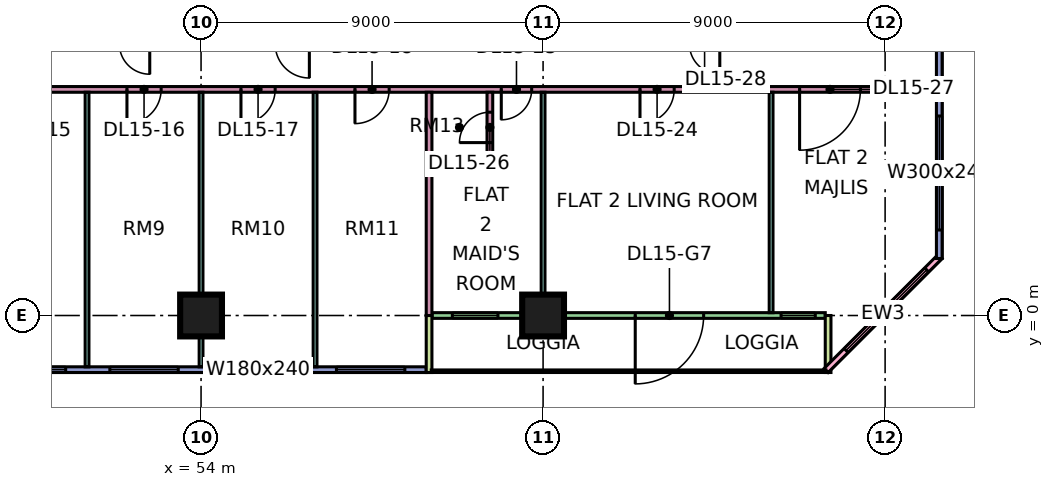
"""IFC4 building model, lengths in metres.
Left out: names, types, materials, properties, quantities, classifications, styles, units other than length and angle.
Written with IfcOpenShell. Run it as: python <this file> out.ifc"""

import sys

from ifc_helpers import new_model, si_unit, direction, frame, frame_2d, origin, origin_2d, place, context, subcontext, project, spatial, rectangle, extrude, element, fill, save


model = new_model("IFC4")
c1 = context("Model", 3, precision=1e-05, world=origin(), true_north=direction((0.0, 1.0)))
c2 = subcontext(c1, "Body", "Model", "MODEL_VIEW")
j1 = project(units=[si_unit("LENGTHUNIT", "METRE"), si_unit("PLANEANGLEUNIT", "RADIAN")], contexts=[c1])
p1 = place(None, origin())
s1 = spatial("IfcSite", under=j1, at=p1, CompositionType="ELEMENT")
p2 = place(p1, origin())
s2 = spatial("IfcBuilding", under=s1, at=p2, CompositionType="ELEMENT")
p3 = place(p2, frame((0.0, 0.0, 71.4)))
s3 = spatial("IfcBuildingStorey", under=s2, at=p3, CompositionType="ELEMENT", Elevation=71.4)
for number, where, z_axis, x_axis in (
    (1, (54.0, 0.0, 0.0), (0.0, 0.0, 1.0), (1.0, 0.0, 0.0)),
    (2, (63.0, 0.0, 0.0), (0.0, 0.0, 1.0), (1.0, 0.0, 0.0)),
):
    element("IfcColumn", number, at=place(p3, frame(where, z_axis=z_axis, x_axis=x_axis)), inside=s3, PredefinedType="COLUMN", context=c2, shape_type="SweptSolid", body=[
        extrude(rectangle(XDim=1.1, YDim=1.1, at=origin_2d()), origin(), (0.0, 0.0, 1.0), 3.75),
    ])
p4 = place(p3, frame((48.075, -1.425, 0.0), z_axis=(0.0, 0.0, 1.0), x_axis=(1.0, 0.0, 0.0)))
e3 = element("IfcWall", 3, at=p4, inside=s3, PredefinedType="SOLIDWALL", context=c2, shape_type="SweptSolid", body=[
    extrude(rectangle(XDim=11.85, YDim=0.15, at=frame_2d((5.925, 0.0))), origin(), (0.0, 0.0, 1.0), 3.35),
])
p5 = place(p4, frame((0.562, 0.0, 0.45)))
e4 = element("IfcOpeningElement", 4, at=p5, cuts=e3, PredefinedType="OPENING", context=c2, shape_type="SweptSolid", body=[
    extrude(rectangle(XDim=1.8, YDim=2.4, at=frame_2d((0.9, 1.2))), frame((0.0, 0.085, 0.0), z_axis=(0.0, -1.0, 0.0), x_axis=(1.0, 0.0, 0.0)), (0.0, 0.0, 1.0), 0.17),
])
p6 = place(p4, frame((3.525, 0.0, 0.45)))
e5 = element("IfcOpeningElement", 5, at=p6, cuts=e3, PredefinedType="OPENING", context=c2, shape_type="SweptSolid", body=[
    extrude(rectangle(XDim=1.8, YDim=2.4, at=frame_2d((0.9, 1.2))), frame((0.0, 0.085, 0.0), z_axis=(0.0, -1.0, 0.0), x_axis=(1.0, 0.0, 0.0)), (0.0, 0.0, 1.0), 0.17),
])
p7 = place(p4, frame((6.525, 0.0, 0.45)))
e6 = element("IfcOpeningElement", 6, at=p7, cuts=e3, PredefinedType="OPENING", context=c2, shape_type="SweptSolid", body=[
    extrude(rectangle(XDim=1.8, YDim=2.4, at=frame_2d((0.9, 1.2))), frame((0.0, 0.085, 0.0), z_axis=(0.0, -1.0, 0.0), x_axis=(1.0, 0.0, 0.0)), (0.0, 0.0, 1.0), 0.17),
])
p8 = place(p4, frame((9.488, 0.0, 0.45)))
e7 = element("IfcOpeningElement", 7, at=p8, cuts=e3, PredefinedType="OPENING", context=c2, shape_type="SweptSolid", body=[
    extrude(rectangle(XDim=1.8, YDim=2.4, at=frame_2d((0.9, 1.2))), frame((0.0, 0.085, 0.0), z_axis=(0.0, -1.0, 0.0), x_axis=(1.0, 0.0, 0.0)), (0.0, 0.0, 1.0), 0.17),
])
p9 = place(p3, frame((60.075, 0.0, 0.0), z_axis=(0.0, 0.0, 1.0), x_axis=(1.0, 0.0, 0.0)))
e8 = element("IfcWall", 8, at=p9, inside=s3, PredefinedType="SOLIDWALL", context=c2, shape_type="SweptSolid", body=[
    extrude(rectangle(XDim=10.35, YDim=0.15, at=frame_2d((5.175, 0.0))), origin(), (0.0, 0.0, 1.0), 3.35),
])
p10 = place(p9, frame((0.538, 0.0, 0.45)))
e9 = element("IfcOpeningElement", 9, at=p10, cuts=e8, PredefinedType="OPENING", context=c2, shape_type="SweptSolid", body=[
    extrude(rectangle(XDim=1.2, YDim=2.4, at=frame_2d((0.6, 1.2))), frame((0.0, 0.085, 0.0), z_axis=(0.0, -1.0, 0.0), x_axis=(1.0, 0.0, 0.0)), (0.0, 0.0, 1.0), 0.17),
])
p11 = place(p9, frame((5.35, 0.0, 0.0)))
e10 = element("IfcOpeningElement", 10, at=p11, cuts=e8, PredefinedType="OPENING", context=c2, shape_type="SweptSolid", body=[
    extrude(rectangle(XDim=1.8, YDim=2.4, at=frame_2d((0.9, 1.2))), frame((0.0, 0.085, 0.0), z_axis=(0.0, -1.0, 0.0), x_axis=(1.0, 0.0, 0.0)), (0.0, 0.0, 1.0), 0.17),
])
p12 = place(p9, frame((9.188, 0.0, 0.45)))
e11 = element("IfcOpeningElement", 11, at=p12, cuts=e8, PredefinedType="OPENING", context=c2, shape_type="SweptSolid", body=[
    extrude(rectangle(XDim=0.9, YDim=2.4, at=frame_2d((0.45, 1.2))), frame((0.0, 0.085, 0.0), z_axis=(0.0, -1.0, 0.0), x_axis=(1.0, 0.0, 0.0)), (0.0, 0.0, 1.0), 0.17),
])
for number, where, z_axis, x_axis in (
    (12, (60.0, -1.5, 0.0), (0.0, 0.0, 1.0), (0.0, 1.0, 0.0)),
    (13, (70.5, -1.5, 0.0), (0.0, 0.0, 1.0), (0.0, 1.0, 0.0)),
):
    element("IfcWall", number, at=place(p3, frame(where, z_axis=z_axis, x_axis=x_axis)), inside=s3, PredefinedType="SOLIDWALL", context=c2, shape_type="SweptSolid", body=[
        extrude(rectangle(XDim=1.5, YDim=0.15, at=frame_2d((0.75, 0.0))), origin(), (0.0, 0.0, 1.0), 3.35),
    ])
p13 = place(p3, frame((70.447, -1.447, 0.0), z_axis=(0.0, 0.0, 1.0), x_axis=(0.707106781187, 0.707106781187, 0.0)))
e14 = element("IfcWall", 14, at=p13, inside=s3, PredefinedType="SOLIDWALL", context=c2, shape_type="SweptSolid", body=[
    extrude(rectangle(XDim=4.243, YDim=0.15, at=frame_2d((2.121, 0.0))), origin(), (0.0, 0.0, 1.0), 3.35),
])
p14 = place(p13, frame((0.744, 0.0, 0.45)))
e15 = element("IfcOpeningElement", 15, at=p14, cuts=e14, PredefinedType="OPENING", context=c2, shape_type="SweptSolid", body=[
    extrude(rectangle(XDim=3.0, YDim=2.4, at=frame_2d((1.5, 1.2))), frame((0.0, 0.085, 0.0), z_axis=(0.0, -1.0, 0.0), x_axis=(1.0, 0.0, 0.0)), (0.0, 0.0, 1.0), 0.17),
])
p15 = place(p3, frame((73.425, 1.5, 0.0), z_axis=(0.0, 0.0, 1.0), x_axis=(0.0, 1.0, 0.0)))
e16 = element("IfcWall", 16, at=p15, inside=s3, PredefinedType="SOLIDWALL", context=c2, shape_type="SweptSolid", body=[
    extrude(rectangle(XDim=10.425, YDim=0.15, at=frame_2d((5.212, 0.0))), origin(), (0.0, 0.0, 1.0), 3.35),
])
p16 = place(p15, frame((0.75, 0.0, 0.45)))
e17 = element("IfcOpeningElement", 17, at=p16, cuts=e16, PredefinedType="OPENING", context=c2, shape_type="SweptSolid", body=[
    extrude(rectangle(XDim=3.0, YDim=2.4, at=frame_2d((1.5, 1.2))), frame((0.0, 0.085, 0.0), z_axis=(0.0, -1.0, 0.0), x_axis=(1.0, 0.0, 0.0)), (0.0, 0.0, 1.0), 0.17),
])
p17 = place(p3, frame((48.1, 5.95, 0.0), z_axis=(0.0, 0.0, 1.0), x_axis=(1.0, 0.0, 0.0)))
e18 = element("IfcWall", 18, at=p17, inside=s3, PredefinedType="PARTITIONING", context=c2, shape_type="SweptSolid", body=[
    extrude(rectangle(XDim=25.25, YDim=0.15, at=frame_2d((12.625, 0.0))), origin(), (0.0, 0.0, 1.0), 3.35),
])
p18 = place(p17, frame((0.95, 0.0, 0.0)))
e19 = element("IfcOpeningElement", 19, at=p18, cuts=e18, PredefinedType="OPENING", context=c2, shape_type="SweptSolid", body=[
    extrude(rectangle(XDim=0.9, YDim=2.1, at=frame_2d((0.45, 1.05))), frame((0.0, 0.085, 0.0), z_axis=(0.0, -1.0, 0.0), x_axis=(1.0, 0.0, 0.0)), (0.0, 0.0, 1.0), 0.17),
])
p19 = place(p17, frame((3.95, 0.0, 0.0)))
e20 = element("IfcOpeningElement", 20, at=p19, cuts=e18, PredefinedType="OPENING", context=c2, shape_type="SweptSolid", body=[
    extrude(rectangle(XDim=0.9, YDim=2.1, at=frame_2d((0.45, 1.05))), frame((0.0, 0.085, 0.0), z_axis=(0.0, -1.0, 0.0), x_axis=(1.0, 0.0, 0.0)), (0.0, 0.0, 1.0), 0.17),
])
p20 = place(p17, frame((6.95, 0.0, 0.0)))
e21 = element("IfcOpeningElement", 21, at=p20, cuts=e18, PredefinedType="OPENING", context=c2, shape_type="SweptSolid", body=[
    extrude(rectangle(XDim=0.9, YDim=2.1, at=frame_2d((0.45, 1.05))), frame((0.0, 0.085, 0.0), z_axis=(0.0, -1.0, 0.0), x_axis=(1.0, 0.0, 0.0)), (0.0, 0.0, 1.0), 0.17),
])
p21 = place(p17, frame((9.95, 0.0, 0.0)))
e22 = element("IfcOpeningElement", 22, at=p21, cuts=e18, PredefinedType="OPENING", context=c2, shape_type="SweptSolid", body=[
    extrude(rectangle(XDim=0.9, YDim=2.1, at=frame_2d((0.45, 1.05))), frame((0.0, 0.085, 0.0), z_axis=(0.0, -1.0, 0.0), x_axis=(1.0, 0.0, 0.0)), (0.0, 0.0, 1.0), 0.17),
])
p22 = place(p17, frame((17.45, 0.0, 0.0)))
e23 = element("IfcOpeningElement", 23, at=p22, cuts=e18, PredefinedType="OPENING", context=c2, shape_type="SweptSolid", body=[
    extrude(rectangle(XDim=0.9, YDim=2.1, at=frame_2d((0.45, 1.05))), frame((0.0, 0.085, 0.0), z_axis=(0.0, -1.0, 0.0), x_axis=(1.0, 0.0, 0.0)), (0.0, 0.0, 1.0), 0.17),
])
p23 = place(p17, frame((13.8, 0.0, 0.0)))
e24 = element("IfcOpeningElement", 24, at=p23, cuts=e18, PredefinedType="OPENING", context=c2, shape_type="SweptSolid", body=[
    extrude(rectangle(XDim=0.8, YDim=2.1, at=frame_2d((0.4, 1.05))), frame((0.0, 0.085, 0.0), z_axis=(0.0, -1.0, 0.0), x_axis=(1.0, 0.0, 0.0)), (0.0, 0.0, 1.0), 0.17),
])
p24 = place(p17, frame((21.65, 0.0, 0.0)))
e25 = element("IfcOpeningElement", 25, at=p24, cuts=e18, PredefinedType="OPENING", context=c2, shape_type="SweptSolid", body=[
    extrude(rectangle(XDim=1.6, YDim=2.1, at=frame_2d((0.8, 1.05))), frame((0.0, 0.085, 0.0), z_axis=(0.0, -1.0, 0.0), x_axis=(1.0, 0.0, 0.0)), (0.0, 0.0, 1.0), 0.17),
])
for number, where, z_axis, x_axis in (
    (26, (51.0, -1.351, 0.0), (0.0, 0.0, 1.0), (0.0, 1.0, 0.0)),
    (27, (54.0, -1.351, 0.0), (0.0, 0.0, 1.0), (0.0, 1.0, 0.0)),
    (28, (57.0, -1.351, 0.0), (0.0, 0.0, 1.0), (0.0, 1.0, 0.0)),
):
    element("IfcWall", number, at=place(p3, frame(where, z_axis=z_axis, x_axis=x_axis)), inside=s3, PredefinedType="PARTITIONING", context=c2, shape_type="SweptSolid", body=[
        extrude(rectangle(XDim=7.226, YDim=0.1, at=frame_2d((3.613, 0.0))), origin(), (0.0, 0.0, 1.0), 3.35),
    ])
p25 = place(p3, frame((60.0, 0.0, 0.0), z_axis=(0.0, 0.0, 1.0), x_axis=(0.0, 1.0, 0.0)))
e29 = element("IfcWall", 29, at=p25, inside=s3, PredefinedType="PARTITIONING", context=c2, shape_type="SweptSolid", body=[
    extrude(rectangle(XDim=5.875, YDim=0.15, at=frame_2d((2.938, 0.0))), origin(), (0.0, 0.0, 1.0), 3.35),
])
p26 = place(p3, frame((60.075, 3.95, 0.0), z_axis=(0.0, 0.0, 1.0), x_axis=(1.0, 0.0, 0.0)))
e30 = element("IfcWall", 30, at=p26, inside=s3, PredefinedType="PARTITIONING", context=c2, shape_type="SweptSolid", body=[
    extrude(rectangle(XDim=1.45, YDim=0.15, at=frame_2d((0.725, 0.0))), origin(), (0.0, 0.0, 1.0), 3.35),
])
p27 = place(p3, frame((61.6, 3.875, 0.0), z_axis=(0.0, 0.0, 1.0), x_axis=(0.0, 1.0, 0.0)))
e31 = element("IfcWall", 31, at=p27, inside=s3, PredefinedType="PARTITIONING", context=c2, shape_type="SweptSolid", body=[
    extrude(rectangle(XDim=2.0, YDim=0.15, at=frame_2d((1.0, 0.0))), origin(), (0.0, 0.0, 1.0), 3.35),
])
p28 = place(p27, frame((0.675, 0.0, 0.0)))
e32 = element("IfcOpeningElement", 32, at=p28, cuts=e31, PredefinedType="OPENING", context=c2, shape_type="SweptSolid", body=[
    extrude(rectangle(XDim=0.8, YDim=2.1, at=frame_2d((0.4, 1.05))), frame((0.0, 0.085, 0.0), z_axis=(0.0, -1.0, 0.0), x_axis=(1.0, 0.0, 0.0)), (0.0, 0.0, 1.0), 0.17),
])
for number, where, z_axis, x_axis in (
    (33, (63.0, 0.074, 0.0), (0.0, 0.0, 1.0), (0.0, 1.0, 0.0)),
    (34, (69.0, 0.074, 0.0), (0.0, 0.0, 1.0), (0.0, 1.0, 0.0)),
):
    element("IfcWall", number, at=place(p3, frame(where, z_axis=z_axis, x_axis=x_axis)), inside=s3, PredefinedType="PARTITIONING", context=c2, shape_type="SweptSolid", body=[
        extrude(rectangle(XDim=5.801, YDim=0.1, at=frame_2d((2.9, 0.0))), origin(), (0.0, 0.0, 1.0), 3.35),
    ])
p29 = place(p5, origin())
e35 = element("IfcWindow", 35, at=p29, inside=s3, PartitioningType="SINGLE_PANEL", PredefinedType="WINDOW", context=c2, shape_type="SweptSolid", body=[
    extrude(rectangle(XDim=1.8, YDim=2.4, at=frame_2d((0.9, 1.2))), frame((0.0, 0.03, 0.0), z_axis=(0.0, -1.0, 0.0), x_axis=(1.0, 0.0, 0.0)), (0.0, 0.0, 1.0), 0.06),
])
fill(e4, e35)
p30 = place(p6, origin())
e36 = element("IfcWindow", 36, at=p30, inside=s3, PartitioningType="SINGLE_PANEL", PredefinedType="WINDOW", context=c2, shape_type="SweptSolid", body=[
    extrude(rectangle(XDim=1.8, YDim=2.4, at=frame_2d((0.9, 1.2))), frame((0.0, 0.03, 0.0), z_axis=(0.0, -1.0, 0.0), x_axis=(1.0, 0.0, 0.0)), (0.0, 0.0, 1.0), 0.06),
])
fill(e5, e36)
p31 = place(p7, origin())
e37 = element("IfcWindow", 37, at=p31, inside=s3, PartitioningType="SINGLE_PANEL", PredefinedType="WINDOW", context=c2, shape_type="SweptSolid", body=[
    extrude(rectangle(XDim=1.8, YDim=2.4, at=frame_2d((0.9, 1.2))), frame((0.0, 0.03, 0.0), z_axis=(0.0, -1.0, 0.0), x_axis=(1.0, 0.0, 0.0)), (0.0, 0.0, 1.0), 0.06),
])
fill(e6, e37)
p32 = place(p8, origin())
e38 = element("IfcWindow", 38, at=p32, inside=s3, PartitioningType="SINGLE_PANEL", PredefinedType="WINDOW", context=c2, shape_type="SweptSolid", body=[
    extrude(rectangle(XDim=1.8, YDim=2.4, at=frame_2d((0.9, 1.2))), frame((0.0, 0.03, 0.0), z_axis=(0.0, -1.0, 0.0), x_axis=(1.0, 0.0, 0.0)), (0.0, 0.0, 1.0), 0.06),
])
fill(e7, e38)
p33 = place(p10, origin())
e39 = element("IfcWindow", 39, at=p33, inside=s3, PartitioningType="SINGLE_PANEL", PredefinedType="WINDOW", context=c2, shape_type="SweptSolid", body=[
    extrude(rectangle(XDim=1.2, YDim=2.4, at=frame_2d((0.6, 1.2))), frame((0.0, 0.03, 0.0), z_axis=(0.0, -1.0, 0.0), x_axis=(1.0, 0.0, 0.0)), (0.0, 0.0, 1.0), 0.06),
])
fill(e9, e39)
p34 = place(p11, frame((1.8, 0.0, 0.0), z_axis=(0.0, 0.0, 1.0), x_axis=(-1.0, 0.0, 0.0)))
e40 = element("IfcDoor", 40, at=p34, inside=s3, OperationType="DOUBLE_DOOR_SINGLE_SWING", PredefinedType="DOOR", context=c2, shape_type="SweptSolid", body=[
    extrude(rectangle(XDim=1.8, YDim=2.4, at=frame_2d((0.9, 1.2))), frame((0.0, 0.025, 0.0), z_axis=(0.0, -1.0, 0.0), x_axis=(1.0, 0.0, 0.0)), (0.0, 0.0, 1.0), 0.05),
])
fill(e10, e40)
p35 = place(p12, origin())
e41 = element("IfcWindow", 41, at=p35, inside=s3, PartitioningType="SINGLE_PANEL", PredefinedType="WINDOW", context=c2, shape_type="SweptSolid", body=[
    extrude(rectangle(XDim=0.9, YDim=2.4, at=frame_2d((0.45, 1.2))), frame((0.0, 0.03, 0.0), z_axis=(0.0, -1.0, 0.0), x_axis=(1.0, 0.0, 0.0)), (0.0, 0.0, 1.0), 0.06),
])
fill(e11, e41)
p36 = place(p14, origin())
e42 = element("IfcWindow", 42, at=p36, inside=s3, PartitioningType="SINGLE_PANEL", PredefinedType="WINDOW", context=c2, shape_type="SweptSolid", body=[
    extrude(rectangle(XDim=3.0, YDim=2.4, at=frame_2d((1.5, 1.2))), frame((0.0, 0.03, 0.0), z_axis=(0.0, -1.0, 0.0), x_axis=(1.0, 0.0, 0.0)), (0.0, 0.0, 1.0), 0.06),
])
fill(e15, e42)
p37 = place(p16, origin())
e43 = element("IfcWindow", 43, at=p37, inside=s3, PartitioningType="SINGLE_PANEL", PredefinedType="WINDOW", context=c2, shape_type="SweptSolid", body=[
    extrude(rectangle(XDim=3.0, YDim=2.4, at=frame_2d((1.5, 1.2))), frame((0.0, 0.03, 0.0), z_axis=(0.0, -1.0, 0.0), x_axis=(1.0, 0.0, 0.0)), (0.0, 0.0, 1.0), 0.06),
])
fill(e17, e43)
p38 = place(p19, frame((0.9, 0.0, 0.0), z_axis=(0.0, 0.0, 1.0), x_axis=(-1.0, 0.0, 0.0)))
e44 = element("IfcDoor", 44, at=p38, inside=s3, OperationType="SINGLE_SWING_LEFT", PredefinedType="DOOR", context=c2, shape_type="SweptSolid", body=[
    extrude(rectangle(XDim=0.9, YDim=2.1, at=frame_2d((0.45, 1.05))), frame((0.0, 0.025, 0.0), z_axis=(0.0, -1.0, 0.0), x_axis=(1.0, 0.0, 0.0)), (0.0, 0.0, 1.0), 0.05),
])
fill(e20, e44)
p39 = place(p20, frame((0.9, 0.0, 0.0), z_axis=(0.0, 0.0, 1.0), x_axis=(-1.0, 0.0, 0.0)))
e45 = element("IfcDoor", 45, at=p39, inside=s3, OperationType="SINGLE_SWING_LEFT", PredefinedType="DOOR", context=c2, shape_type="SweptSolid", body=[
    extrude(rectangle(XDim=0.9, YDim=2.1, at=frame_2d((0.45, 1.05))), frame((0.0, 0.025, 0.0), z_axis=(0.0, -1.0, 0.0), x_axis=(1.0, 0.0, 0.0)), (0.0, 0.0, 1.0), 0.05),
])
fill(e21, e45)
p40 = place(p21, frame((0.9, 0.0, 0.0), z_axis=(0.0, 0.0, 1.0), x_axis=(-1.0, 0.0, 0.0)))
e46 = element("IfcDoor", 46, at=p40, inside=s3, OperationType="SINGLE_SWING_LEFT", PredefinedType="DOOR", context=c2, shape_type="SweptSolid", body=[
    extrude(rectangle(XDim=0.9, YDim=2.1, at=frame_2d((0.45, 1.05))), frame((0.0, 0.025, 0.0), z_axis=(0.0, -1.0, 0.0), x_axis=(1.0, 0.0, 0.0)), (0.0, 0.0, 1.0), 0.05),
])
fill(e22, e46)
p41 = place(p22, frame((0.9, 0.0, 0.0), z_axis=(0.0, 0.0, 1.0), x_axis=(-1.0, 0.0, 0.0)))
e47 = element("IfcDoor", 47, at=p41, inside=s3, OperationType="SINGLE_SWING_LEFT", PredefinedType="DOOR", context=c2, shape_type="SweptSolid", body=[
    extrude(rectangle(XDim=0.9, YDim=2.1, at=frame_2d((0.45, 1.05))), frame((0.0, 0.025, 0.0), z_axis=(0.0, -1.0, 0.0), x_axis=(1.0, 0.0, 0.0)), (0.0, 0.0, 1.0), 0.05),
])
fill(e23, e47)
p42 = place(p23, frame((0.8, 0.0, 0.0), z_axis=(0.0, 0.0, 1.0), x_axis=(-1.0, 0.0, 0.0)))
e48 = element("IfcDoor", 48, at=p42, inside=s3, OperationType="SINGLE_SWING_LEFT", PredefinedType="DOOR", context=c2, shape_type="SweptSolid", body=[
    extrude(rectangle(XDim=0.8, YDim=2.1, at=frame_2d((0.4, 1.05))), frame((0.0, 0.025, 0.0), z_axis=(0.0, -1.0, 0.0), x_axis=(1.0, 0.0, 0.0)), (0.0, 0.0, 1.0), 0.05),
])
fill(e24, e48)
p43 = place(p28, origin())
e49 = element("IfcDoor", 49, at=p43, inside=s3, OperationType="SINGLE_SWING_LEFT", PredefinedType="DOOR", context=c2, shape_type="SweptSolid", body=[
    extrude(rectangle(XDim=0.8, YDim=2.1, at=frame_2d((0.4, 1.05))), frame((0.0, 0.025, 0.0), z_axis=(0.0, -1.0, 0.0), x_axis=(1.0, 0.0, 0.0)), (0.0, 0.0, 1.0), 0.05),
])
fill(e32, e49)
p44 = place(p24, frame((1.6, 0.0, 0.0), z_axis=(0.0, 0.0, 1.0), x_axis=(-1.0, 0.0, 0.0)))
e50 = element("IfcDoor", 50, at=p44, inside=s3, OperationType="DOUBLE_DOOR_SINGLE_SWING", PredefinedType="DOOR", context=c2, shape_type="SweptSolid", body=[
    extrude(rectangle(XDim=1.6, YDim=2.1, at=frame_2d((0.8, 1.05))), frame((0.0, 0.025, 0.0), z_axis=(0.0, -1.0, 0.0), x_axis=(1.0, 0.0, 0.0)), (0.0, 0.0, 1.0), 0.05),
])
fill(e25, e50)
save(model, sys.argv[1])
